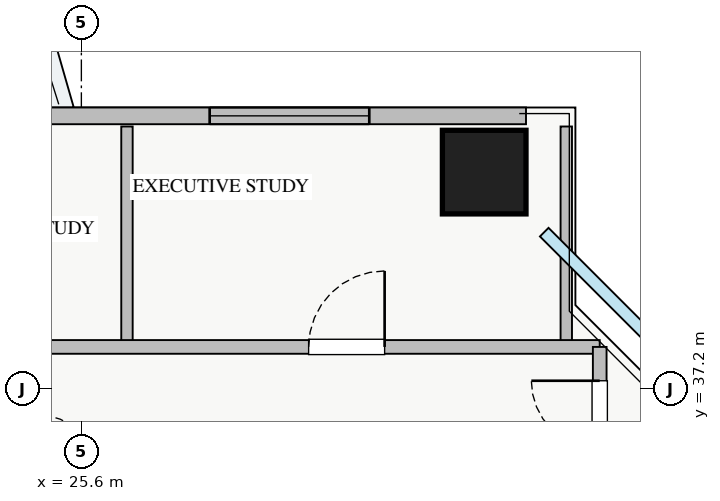
"""IFC4 building model, lengths in metres.
Left out: names, types, materials, properties, quantities, classifications, styles, units other than length and angle.
Written with IfcOpenShell. Run it as: python <this file> out.ifc"""

import sys

from ifc_helpers import new_model, si_unit, direction, frame, frame_2d, origin, origin_2d, place, context, subcontext, project, spatial, rectangle, extrude, source, transform, mapped, element, fill, save


model = new_model("IFC4")
c1 = context("Model", 3, precision=1e-05, world=origin(), true_north=direction((0.0, 1.0)))
c2 = subcontext(c1, "Body", "Model", "MODEL_VIEW")
j1 = project(units=[si_unit("LENGTHUNIT", "METRE"), si_unit("PLANEANGLEUNIT", "RADIAN")], contexts=[c1])
p1 = place(None, origin())
s1 = spatial("IfcSite", under=j1, at=p1, CompositionType="ELEMENT")
p2 = place(p1, origin())
s2 = spatial("IfcBuilding", under=s1, at=p2, CompositionType="ELEMENT")
p3 = place(p2, frame((0.0, 0.0, 119.75)))
s3 = spatial("IfcBuildingStorey", under=s2, at=p3, CompositionType="ELEMENT", Elevation=119.75)
m1 = source(origin(), c2, "Body", "SweptSolid", [
    extrude(rectangle(XDim=1.1, YDim=1.1, at=origin_2d()), origin(), (0.0, 0.0, 1.0), 3.25),
])
p4 = place(p3, frame((30.9, 40.05, 0.0), z_axis=(0.0, 0.0, 1.0), x_axis=(1.0, 0.0, 0.0)))
e1 = element("IfcColumn", 1, at=p4, inside=s3, PredefinedType="COLUMN", context=c2, shape_type="MappedRepresentation", body=[
    mapped(m1, transform((0.0, 0.0, 0.0), x_axis=(1.0, 0.0, 0.0), y_axis=(0.0, 1.0, 0.0), z_axis=(0.0, 0.0, 1.0), scale=1.0)),
])
p5 = place(p3, frame((6.55, 40.79, 0.0), z_axis=(0.0, 0.0, 1.0), x_axis=(1.0, 0.0, 0.0)))
e2 = element("IfcWall", 2, at=p5, inside=s3, PredefinedType="STANDARD", context=c2, shape_type="SweptSolid", body=[
    extrude(rectangle(XDim=24.9, YDim=0.22, at=frame_2d((12.45, 0.0))), origin(), (0.0, 0.0, 1.0), 2.61),
])
p6 = place(p5, frame((13.3, 0.0, 0.0)))
e3 = element("IfcOpeningElement", 3, at=p6, cuts=e2, PredefinedType="OPENING", context=c2, shape_type="SweptSolid", body=[
    extrude(rectangle(XDim=1.2, YDim=2.1, at=frame_2d((0.6, 1.05))), frame((0.0, 0.12, 0.0), z_axis=(0.0, -1.0, 0.0), x_axis=(1.0, 0.0, 0.0)), (0.0, 0.0, 1.0), 0.24),
])
p7 = place(p5, frame((3.635, 0.0, 0.9)))
e4 = element("IfcOpeningElement", 4, at=p7, cuts=e2, PredefinedType="OPENING", context=c2, shape_type="SweptSolid", body=[
    extrude(rectangle(XDim=2.4, YDim=1.5, at=frame_2d((1.2, 0.75))), frame((0.0, 0.12, 0.0), z_axis=(0.0, -1.0, 0.0), x_axis=(1.0, 0.0, 0.0)), (0.0, 0.0, 1.0), 0.24),
])
p8 = place(p5, frame((8.438, 0.0, 0.9)))
e5 = element("IfcOpeningElement", 5, at=p8, cuts=e2, PredefinedType="OPENING", context=c2, shape_type="SweptSolid", body=[
    extrude(rectangle(XDim=1.8, YDim=1.45, at=frame_2d((0.9, 0.725))), frame((0.0, 0.12, 0.0), z_axis=(0.0, -1.0, 0.0), x_axis=(1.0, 0.0, 0.0)), (0.0, 0.0, 1.0), 0.24),
])
p9 = place(p5, frame((14.813, 0.0, 0.9)))
e6 = element("IfcOpeningElement", 6, at=p9, cuts=e2, PredefinedType="OPENING", context=c2, shape_type="SweptSolid", body=[
    extrude(rectangle(XDim=1.5, YDim=1.45, at=frame_2d((0.75, 0.725))), frame((0.0, 0.12, 0.0), z_axis=(0.0, -1.0, 0.0), x_axis=(1.0, 0.0, 0.0)), (0.0, 0.0, 1.0), 0.24),
])
p10 = place(p5, frame((20.738, 0.0, 0.9)))
e7 = element("IfcOpeningElement", 7, at=p10, cuts=e2, PredefinedType="OPENING", context=c2, shape_type="SweptSolid", body=[
    extrude(rectangle(XDim=2.1, YDim=1.48, at=frame_2d((1.05, 0.74))), frame((0.0, 0.12, 0.0), z_axis=(0.0, -1.0, 0.0), x_axis=(1.0, 0.0, 0.0)), (0.0, 0.0, 1.0), 0.24),
])
p11 = place(p5, frame((0.258, 0.0, 0.9)))
e8 = element("IfcOpeningElement", 8, at=p11, cuts=e2, PredefinedType="OPENING", context=c2, shape_type="SweptSolid", body=[
    extrude(rectangle(XDim=1.8, YDim=1.5, at=frame_2d((0.9, 0.75))), frame((0.0, 0.12, 0.0), z_axis=(0.0, -1.0, 0.0), x_axis=(1.0, 0.0, 0.0)), (0.0, 0.0, 1.0), 0.24),
])
for number, where, z_axis, x_axis in (
    (9, (26.2, 37.75, 0.0), (0.0, 0.0, 1.0), (0.0, 1.0, 0.0)),
    (10, (31.98, 37.75, 0.0), (0.0, 0.0, 1.0), (0.0, 1.0, 0.0)),
):
    element("IfcWall", number, at=place(p3, frame(where, z_axis=z_axis, x_axis=x_axis)), inside=s3, PredefinedType="PARTITIONING", context=c2, shape_type="SweptSolid", body=[
        extrude(rectangle(XDim=2.9, YDim=0.15, at=frame_2d((1.45, 0.0))), origin(), (0.0, 0.0, 1.0), 3.07),
    ])
p12 = place(p3, frame((8.85, 37.75, 0.0), z_axis=(0.0, 0.0, 1.0), x_axis=(1.0, 0.0, 0.0)))
e11 = element("IfcWall", 11, at=p12, inside=s3, PredefinedType="PARTITIONING", context=c2, shape_type="SweptSolid", body=[
    extrude(rectangle(XDim=23.57, YDim=0.18, at=frame_2d((11.785, 0.0))), origin(), (0.0, 0.0, 1.0), 3.07),
])
p13 = place(p12, frame((2.035, 0.0, 0.0)))
e12 = element("IfcOpeningElement", 12, at=p13, cuts=e11, PredefinedType="OPENING", context=c2, shape_type="SweptSolid", body=[
    extrude(rectangle(XDim=1.0, YDim=2.05, at=frame_2d((0.5, 1.025))), frame((0.0, 0.1, 0.0), z_axis=(0.0, -1.0, 0.0), x_axis=(1.0, 0.0, 0.0)), (0.0, 0.0, 1.0), 0.2),
])
p14 = place(p12, frame((7.16, 0.0, 0.0)))
e13 = element("IfcOpeningElement", 13, at=p14, cuts=e11, PredefinedType="OPENING", context=c2, shape_type="SweptSolid", body=[
    extrude(rectangle(XDim=1.0, YDim=2.05, at=frame_2d((0.5, 1.025))), frame((0.0, 0.1, 0.0), z_axis=(0.0, -1.0, 0.0), x_axis=(1.0, 0.0, 0.0)), (0.0, 0.0, 1.0), 0.2),
])
p15 = place(p12, frame((13.3, 0.0, 0.0)))
e14 = element("IfcOpeningElement", 14, at=p15, cuts=e11, PredefinedType="OPENING", context=c2, shape_type="SweptSolid", body=[
    extrude(rectangle(XDim=1.0, YDim=2.05, at=frame_2d((0.5, 1.025))), frame((0.0, 0.1, 0.0), z_axis=(0.0, -1.0, 0.0), x_axis=(1.0, 0.0, 0.0)), (0.0, 0.0, 1.0), 0.2),
])
p16 = place(p12, frame((19.74, 0.0, 0.0)))
e15 = element("IfcOpeningElement", 15, at=p16, cuts=e11, PredefinedType="OPENING", context=c2, shape_type="SweptSolid", body=[
    extrude(rectangle(XDim=1.0, YDim=2.05, at=frame_2d((0.5, 1.025))), frame((0.0, 0.1, 0.0), z_axis=(0.0, -1.0, 0.0), x_axis=(1.0, 0.0, 0.0)), (0.0, 0.0, 1.0), 0.2),
])
p17 = place(p3, frame((32.42, 8.25, 0.0), z_axis=(0.0, 0.0, 1.0), x_axis=(0.0, 1.0, 0.0)))
e16 = element("IfcWall", 16, at=p17, inside=s3, PredefinedType="PARTITIONING", context=c2, shape_type="SweptSolid", body=[
    extrude(rectangle(XDim=29.5, YDim=0.18, at=frame_2d((14.75, 0.0))), origin(), (0.0, 0.0, 1.0), 3.07),
])
p18 = place(p17, frame((28.155, 0.0, 0.0)))
e17 = element("IfcOpeningElement", 17, at=p18, cuts=e16, PredefinedType="OPENING", context=c2, shape_type="SweptSolid", body=[
    extrude(rectangle(XDim=0.9, YDim=2.05, at=frame_2d((0.45, 1.025))), frame((0.0, 0.1, 0.0), z_axis=(0.0, -1.0, 0.0), x_axis=(1.0, 0.0, 0.0)), (0.0, 0.0, 1.0), 0.2),
])
p19 = place(p17, frame((0.445, 0.0, 0.0)))
e18 = element("IfcOpeningElement", 18, at=p19, cuts=e16, PredefinedType="OPENING", context=c2, shape_type="SweptSolid", body=[
    extrude(rectangle(XDim=0.9, YDim=2.05, at=frame_2d((0.45, 1.025))), frame((0.0, 0.1, 0.0), z_axis=(0.0, -1.0, 0.0), x_axis=(1.0, 0.0, 0.0)), (0.0, 0.0, 1.0), 0.2),
])
p20 = place(p17, frame((4.76, 0.0, 0.0)))
e19 = element("IfcOpeningElement", 19, at=p20, cuts=e16, PredefinedType="OPENING", context=c2, shape_type="SweptSolid", body=[
    extrude(rectangle(XDim=1.0, YDim=2.05, at=frame_2d((0.5, 1.025))), frame((0.0, 0.1, 0.0), z_axis=(0.0, -1.0, 0.0), x_axis=(1.0, 0.0, 0.0)), (0.0, 0.0, 1.0), 0.2),
])
p21 = place(p17, frame((18.04, 0.0, 0.0)))
e20 = element("IfcOpeningElement", 20, at=p21, cuts=e16, PredefinedType="OPENING", context=c2, shape_type="SweptSolid", body=[
    extrude(rectangle(XDim=1.0, YDim=2.05, at=frame_2d((0.5, 1.025))), frame((0.0, 0.1, 0.0), z_axis=(0.0, -1.0, 0.0), x_axis=(1.0, 0.0, 0.0)), (0.0, 0.0, 1.0), 0.2),
])
m2 = source(origin(), c2, "Body", "SweptSolid", [
    extrude(rectangle(XDim=2.1, YDim=1.48, at=frame_2d((1.05, 0.74))), frame((0.0, 0.03, 0.0), z_axis=(0.0, -1.0, 0.0), x_axis=(1.0, 0.0, 0.0)), (0.0, 0.0, 1.0), 0.06),
])
p22 = place(p10, origin())
e21 = element("IfcWindow", 21, at=p22, inside=s3, PartitioningType="TRIPLE_PANEL_VERTICAL", PredefinedType="WINDOW", context=c2, shape_type="MappedRepresentation", body=[
    mapped(m2, transform((0.0, 0.0, 0.0), x_axis=(1.0, 0.0, 0.0), y_axis=(0.0, 1.0, 0.0), z_axis=(0.0, 0.0, 1.0), scale=1.0)),
])
fill(e7, e21)
m3 = source(origin(), c2, "Body", "SweptSolid", [
    extrude(rectangle(XDim=1.0, YDim=2.05, at=frame_2d((0.5, 1.025))), frame((0.0, 0.025, 0.0), z_axis=(0.0, -1.0, 0.0), x_axis=(1.0, 0.0, 0.0)), (0.0, 0.0, 1.0), 0.05),
])
p23 = place(p16, origin())
e22 = element("IfcDoor", 22, at=p23, inside=s3, OperationType="SINGLE_SWING_RIGHT", PredefinedType="DOOR", context=c2, shape_type="MappedRepresentation", body=[
    mapped(m3, transform((0.0, 0.0, 0.0), x_axis=(1.0, 0.0, 0.0), y_axis=(0.0, 1.0, 0.0), z_axis=(0.0, 0.0, 1.0), scale=1.0)),
])
fill(e15, e22)
m4 = source(origin(), c2, "Body", "SweptSolid", [
    extrude(rectangle(XDim=0.9, YDim=2.05, at=frame_2d((0.45, 1.025))), frame((0.0, 0.025, 0.0), z_axis=(0.0, -1.0, 0.0), x_axis=(1.0, 0.0, 0.0)), (0.0, 0.0, 1.0), 0.05),
])
p24 = place(p18, origin())
e23 = element("IfcDoor", 23, at=p24, inside=s3, OperationType="SINGLE_SWING_RIGHT", PredefinedType="DOOR", context=c2, shape_type="MappedRepresentation", body=[
    mapped(m4, transform((0.0, 0.0, 0.0), x_axis=(1.0, 0.0, 0.0), y_axis=(0.0, 1.0, 0.0), z_axis=(0.0, 0.0, 1.0), scale=1.0)),
])
fill(e17, e23)
save(model, sys.argv[1])
